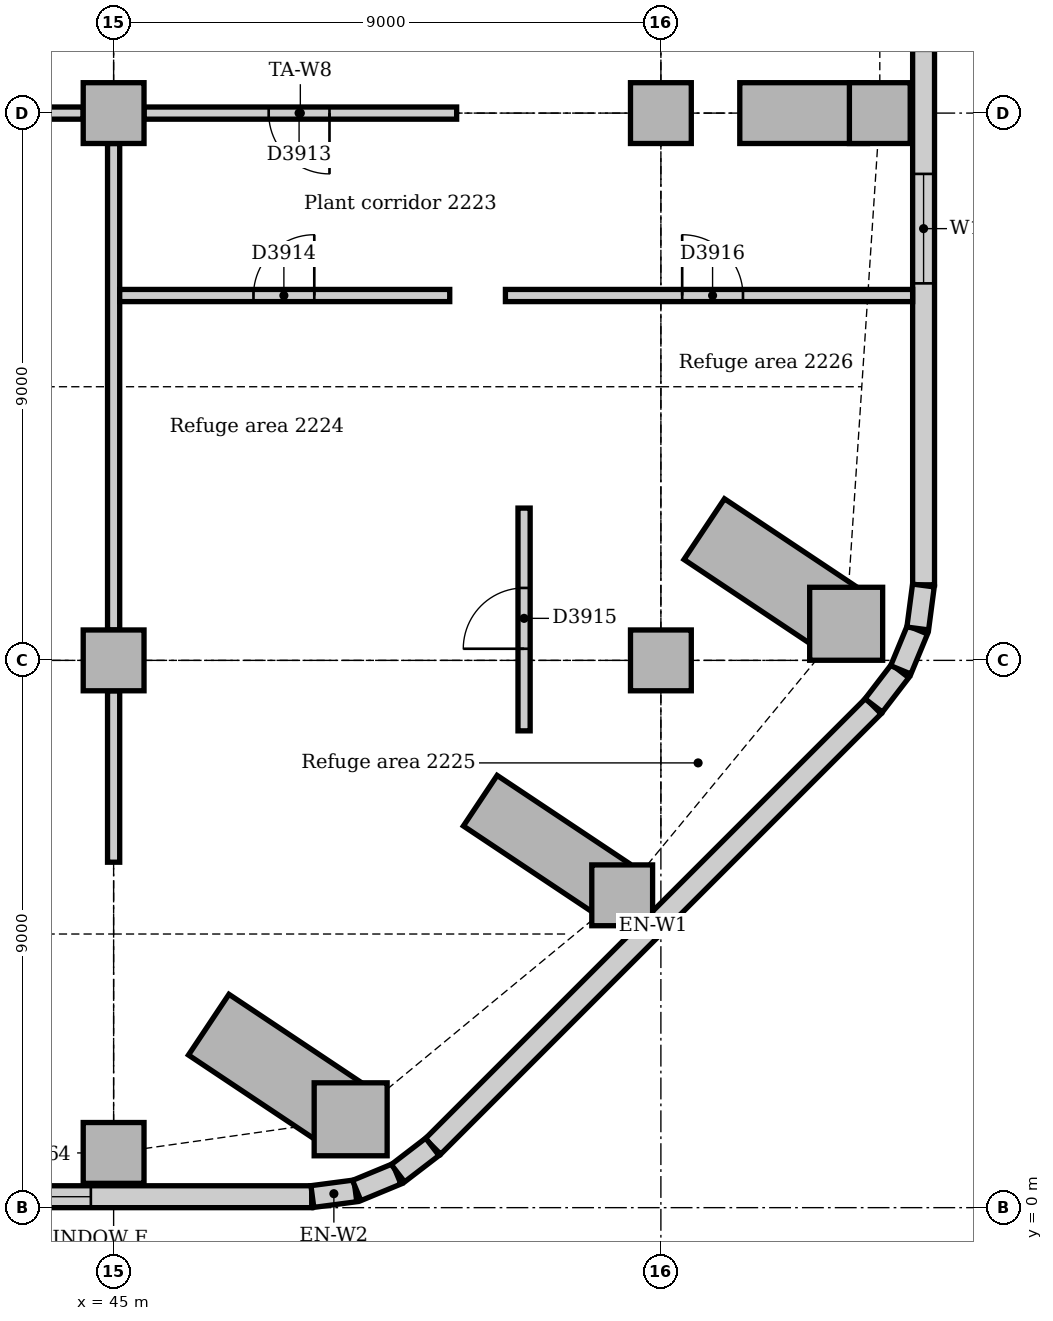
"""IFC4 building model, lengths in metres.
Left out: names, types, materials, properties, quantities, classifications, styles, units other than length and angle.
Written with IfcOpenShell. Run it as: python <this file> out.ifc"""

import sys

from ifc_helpers import new_model, si_unit, direction, frame, frame_2d, origin, origin_2d, place, context, subcontext, project, spatial, rectangle, extrude, element, fill, save


model = new_model("IFC4")
c1 = context("Model", 3, precision=1e-05, world=origin(), true_north=direction((0.0, 1.0)))
c2 = subcontext(c1, "Body", "Model", "MODEL_VIEW")
j1 = project(units=[si_unit("LENGTHUNIT", "METRE"), si_unit("PLANEANGLEUNIT", "RADIAN")], contexts=[c1])
p1 = place(None, origin())
s1 = spatial("IfcSite", under=j1, at=p1, CompositionType="ELEMENT")
p2 = place(p1, origin())
s2 = spatial("IfcBuilding", under=s1, at=p2, CompositionType="ELEMENT")
p3 = place(p2, frame((0.0, 0.0, 95.0)))
s3 = spatial("IfcBuildingStorey", under=s2, at=p3, CompositionType="ELEMENT", Elevation=95.0)
for number, where, z_axis, x_axis in (
    (1, (48.898, 1.453, 0.0), (0.0, 0.0, 1.0), (1.0, 0.0, 0.0)),
    (2, (57.047, 9.602, 0.0), (0.0, 0.0, 1.0), (1.0, 0.0, 0.0)),
):
    element("IfcColumn", number, at=place(p3, frame(where, z_axis=z_axis, x_axis=x_axis)), inside=s3, PredefinedType="COLUMN", context=c2, shape_type="SweptSolid", body=[
        extrude(rectangle(XDim=1.2, YDim=1.2, at=origin_2d()), origin(), (0.0, 0.0, 1.0), 4.85),
    ])
for number, where, z_axis, x_axis in (
    (3, (45.0, 0.9, 0.0), (0.0, 0.0, 1.0), (1.0, 0.0, 0.0)),
    (4, (53.364, 5.136, 0.0), (0.0, 0.0, 1.0), (1.0, 0.0, 0.0)),
    (5, (57.6, 18.0, 0.0), (0.0, 0.0, 1.0), (1.0, 0.0, 0.0)),
    (6, (45.0, 9.0, 0.0), (0.0, 0.0, 1.0), (1.0, 0.0, 0.0)),
    (7, (45.0, 18.0, 0.0), (0.0, 0.0, 1.0), (1.0, 0.0, 0.0)),
    (8, (54.0, 9.0, 0.0), (0.0, 0.0, 1.0), (1.0, 0.0, 0.0)),
    (9, (54.0, 18.0, 0.0), (0.0, 0.0, 1.0), (1.0, 0.0, 0.0)),
):
    element("IfcColumn", number, at=place(p3, frame(where, z_axis=z_axis, x_axis=x_axis)), inside=s3, PredefinedType="COLUMN", context=c2, shape_type="SweptSolid", body=[
        extrude(rectangle(XDim=1.0, YDim=1.0, at=origin_2d()), origin(), (0.0, 0.0, 1.0), 4.85),
    ])
p4 = place(p3, frame((4.243, 0.18, 0.0), z_axis=(0.0, 0.0, 1.0), x_axis=(1.0, 0.0, 0.0)))
e10 = element("IfcWall", 10, at=p4, inside=s3, PredefinedType="STANDARD", context=c2, shape_type="SweptSolid", body=[
    extrude(rectangle(XDim=44.015, YDim=0.36, at=frame_2d((22.007, 0.0))), origin(), (0.0, 0.0, 1.0), 4.85),
])
p5 = place(p4, frame((2.257, 0.0, 1.2)))
e11 = element("IfcOpeningElement", 11, at=p5, cuts=e10, PredefinedType="OPENING", context=c2, shape_type="SweptSolid", body=[
    extrude(rectangle(XDim=1.8, YDim=1.2, at=frame_2d((0.9, 0.6))), frame((0.0, 0.19, 0.0), z_axis=(0.0, -1.0, 0.0), x_axis=(1.0, 0.0, 0.0)), (0.0, 0.0, 1.0), 0.38),
])
p6 = place(p4, frame((6.857, 0.0, 0.9)))
e12 = element("IfcOpeningElement", 12, at=p6, cuts=e10, PredefinedType="OPENING", context=c2, shape_type="SweptSolid", body=[
    extrude(rectangle(XDim=3.3, YDim=2.2, at=frame_2d((1.65, 1.1))), frame((0.0, 0.19, 0.0), z_axis=(0.0, -1.0, 0.0), x_axis=(1.0, 0.0, 0.0)), (0.0, 0.0, 1.0), 0.38),
])
p7 = place(p4, frame((11.257, 0.0, 1.2)))
e13 = element("IfcOpeningElement", 13, at=p7, cuts=e10, PredefinedType="OPENING", context=c2, shape_type="SweptSolid", body=[
    extrude(rectangle(XDim=1.8, YDim=1.2, at=frame_2d((0.9, 0.6))), frame((0.0, 0.19, 0.0), z_axis=(0.0, -1.0, 0.0), x_axis=(1.0, 0.0, 0.0)), (0.0, 0.0, 1.0), 0.38),
])
p8 = place(p4, frame((15.857, 0.0, 0.9)))
e14 = element("IfcOpeningElement", 14, at=p8, cuts=e10, PredefinedType="OPENING", context=c2, shape_type="SweptSolid", body=[
    extrude(rectangle(XDim=3.3, YDim=2.2, at=frame_2d((1.65, 1.1))), frame((0.0, 0.19, 0.0), z_axis=(0.0, -1.0, 0.0), x_axis=(1.0, 0.0, 0.0)), (0.0, 0.0, 1.0), 0.38),
])
p9 = place(p4, frame((20.257, 0.0, 1.2)))
e15 = element("IfcOpeningElement", 15, at=p9, cuts=e10, PredefinedType="OPENING", context=c2, shape_type="SweptSolid", body=[
    extrude(rectangle(XDim=1.8, YDim=1.2, at=frame_2d((0.9, 0.6))), frame((0.0, 0.19, 0.0), z_axis=(0.0, -1.0, 0.0), x_axis=(1.0, 0.0, 0.0)), (0.0, 0.0, 1.0), 0.38),
])
p10 = place(p4, frame((24.857, 0.0, 0.9)))
e16 = element("IfcOpeningElement", 16, at=p10, cuts=e10, PredefinedType="OPENING", context=c2, shape_type="SweptSolid", body=[
    extrude(rectangle(XDim=3.3, YDim=2.2, at=frame_2d((1.65, 1.1))), frame((0.0, 0.19, 0.0), z_axis=(0.0, -1.0, 0.0), x_axis=(1.0, 0.0, 0.0)), (0.0, 0.0, 1.0), 0.38),
])
p11 = place(p4, frame((29.257, 0.0, 1.2)))
e17 = element("IfcOpeningElement", 17, at=p11, cuts=e10, PredefinedType="OPENING", context=c2, shape_type="SweptSolid", body=[
    extrude(rectangle(XDim=1.8, YDim=1.2, at=frame_2d((0.9, 0.6))), frame((0.0, 0.19, 0.0), z_axis=(0.0, -1.0, 0.0), x_axis=(1.0, 0.0, 0.0)), (0.0, 0.0, 1.0), 0.38),
])
p12 = place(p4, frame((33.857, 0.0, 0.9)))
e18 = element("IfcOpeningElement", 18, at=p12, cuts=e10, PredefinedType="OPENING", context=c2, shape_type="SweptSolid", body=[
    extrude(rectangle(XDim=3.3, YDim=2.2, at=frame_2d((1.65, 1.1))), frame((0.0, 0.19, 0.0), z_axis=(0.0, -1.0, 0.0), x_axis=(1.0, 0.0, 0.0)), (0.0, 0.0, 1.0), 0.38),
])
p13 = place(p4, frame((38.583, 0.0, 0.9)))
e19 = element("IfcOpeningElement", 19, at=p13, cuts=e10, PredefinedType="OPENING", context=c2, shape_type="SweptSolid", body=[
    extrude(rectangle(XDim=1.8, YDim=2.2, at=frame_2d((0.9, 1.1))), frame((0.0, 0.19, 0.0), z_axis=(0.0, -1.0, 0.0), x_axis=(1.0, 0.0, 0.0)), (0.0, 0.0, 1.0), 0.38),
])
p14 = place(p3, frame((50.251, 1.006, 0.0), z_axis=(0.0, 0.0, 1.0), x_axis=(0.707106781187, 0.707106781187, 0.0)))
e20 = element("IfcWall", 20, at=p14, inside=s3, PredefinedType="STANDARD", context=c2, shape_type="SweptSolid", body=[
    extrude(rectangle(XDim=10.243, YDim=0.36, at=frame_2d((5.121, 0.0))), origin(), (0.0, 0.0, 1.0), 4.85),
])
p15 = place(p3, frame((58.32, 10.243, 0.0), z_axis=(0.0, 0.0, 1.0), x_axis=(0.0, 1.0, 0.0)))
e21 = element("IfcWall", 21, at=p15, inside=s3, PredefinedType="STANDARD", context=c2, shape_type="SweptSolid", body=[
    extrude(rectangle(XDim=24.515, YDim=0.36, at=frame_2d((12.257, 0.0))), origin(), (0.0, 0.0, 1.0), 4.85),
])
p16 = place(p15, frame((4.957, 0.0, 1.2)))
e22 = element("IfcOpeningElement", 22, at=p16, cuts=e21, PredefinedType="OPENING", context=c2, shape_type="SweptSolid", body=[
    extrude(rectangle(XDim=1.8, YDim=1.2, at=frame_2d((0.9, 0.6))), frame((0.0, 0.19, 0.0), z_axis=(0.0, -1.0, 0.0), x_axis=(1.0, 0.0, 0.0)), (0.0, 0.0, 1.0), 0.38),
])
p17 = place(p15, frame((8.782, 0.0, 0.9)))
e23 = element("IfcOpeningElement", 23, at=p17, cuts=e21, PredefinedType="OPENING", context=c2, shape_type="SweptSolid", body=[
    extrude(rectangle(XDim=1.8, YDim=2.2, at=frame_2d((0.9, 1.1))), frame((0.0, 0.19, 0.0), z_axis=(0.0, -1.0, 0.0), x_axis=(1.0, 0.0, 0.0)), (0.0, 0.0, 1.0), 0.38),
])
p18 = place(p15, frame((13.232, 0.0, 0.9)))
e24 = element("IfcOpeningElement", 24, at=p18, cuts=e21, PredefinedType="OPENING", context=c2, shape_type="SweptSolid", body=[
    extrude(rectangle(XDim=1.8, YDim=2.2, at=frame_2d((0.9, 1.1))), frame((0.0, 0.19, 0.0), z_axis=(0.0, -1.0, 0.0), x_axis=(1.0, 0.0, 0.0)), (0.0, 0.0, 1.0), 0.38),
])
p19 = place(p15, frame((19.232, 0.0, 0.9)))
e25 = element("IfcOpeningElement", 25, at=p19, cuts=e21, PredefinedType="OPENING", context=c2, shape_type="SweptSolid", body=[
    extrude(rectangle(XDim=1.8, YDim=2.2, at=frame_2d((0.9, 1.1))), frame((0.0, 0.19, 0.0), z_axis=(0.0, -1.0, 0.0), x_axis=(1.0, 0.0, 0.0)), (0.0, 0.0, 1.0), 0.38),
])
for number, where, z_axis, x_axis in (
    (26, (48.269, 0.183, 0.0), (0.0, 0.0, 1.0), (0.991, 0.131, 0.0)),
    (27, (48.997, 0.282, 0.0), (0.0, 0.0, 1.0), (0.924, 0.383, 0.0)),
):
    element("IfcWall", number, at=place(p3, frame(where, z_axis=z_axis, x_axis=x_axis)), inside=s3, PredefinedType="STANDARD", context=c2, shape_type="SweptSolid", body=[
        extrude(rectangle(XDim=0.713, YDim=0.36, at=frame_2d((0.356, 0.0))), origin(), (0.0, 0.0, 1.0), 4.85),
    ])
for number, where, z_axis, x_axis in (
    (28, (49.675, 0.566, 0.0), (0.0, 0.0, 1.0), (0.793, 0.609, 0.0)),
    (29, (57.5, 8.259, 0.0), (0.0, 0.0, 1.0), (0.609, 0.793, 0.0)),
):
    element("IfcWall", number, at=place(p3, frame(where, z_axis=z_axis, x_axis=x_axis)), inside=s3, PredefinedType="STANDARD", context=c2, shape_type="SweptSolid", body=[
        extrude(rectangle(XDim=0.713, YDim=0.36, at=frame_2d((0.357, 0.0))), origin(), (0.0, 0.0, 1.0), 4.85),
    ])
for number, where, z_axis, x_axis in (
    (30, (57.945, 8.844, 0.0), (0.0, 0.0, 1.0), (0.383, 0.924, 0.0)),
    (31, (58.224, 9.524, 0.0), (0.0, 0.0, 1.0), (0.131, 0.991, 0.0)),
):
    element("IfcWall", number, at=place(p3, frame(where, z_axis=z_axis, x_axis=x_axis)), inside=s3, PredefinedType="STANDARD", context=c2, shape_type="SweptSolid", body=[
        extrude(rectangle(XDim=0.713, YDim=0.36, at=frame_2d((0.356, 0.0))), origin(), (0.0, 0.0, 1.0), 4.85),
    ])
p20 = place(p3, frame((45.5, 18.0, 0.0), z_axis=(0.0, 0.0, 1.0), x_axis=(1.0, 0.0, 0.0)))
e32 = element("IfcWall", 32, at=p20, inside=s3, PredefinedType="PARTITIONING", context=c2, shape_type="SweptSolid", body=[
    extrude(rectangle(XDim=5.141, YDim=0.2, at=frame_2d((2.571, 0.0))), origin(), (0.0, 0.0, 1.0), 4.254),
])
p21 = place(p20, frame((2.05, 0.0, 0.0)))
e33 = element("IfcOpeningElement", 33, at=p21, cuts=e32, PredefinedType="OPENING", context=c2, shape_type="SweptSolid", body=[
    extrude(rectangle(XDim=1.0, YDim=2.1, at=frame_2d((0.5, 1.05))), frame((0.0, 0.11, 0.0), z_axis=(0.0, -1.0, 0.0), x_axis=(1.0, 0.0, 0.0)), (0.0, 0.0, 1.0), 0.22),
])
p22 = place(p3, frame((36.5, 18.0, 0.0), z_axis=(0.0, 0.0, 1.0), x_axis=(1.0, 0.0, 0.0)))
e34 = element("IfcWall", 34, at=p22, inside=s3, PredefinedType="PARTITIONING", context=c2, shape_type="SweptSolid", body=[
    extrude(rectangle(XDim=8.0, YDim=0.2, at=frame_2d((4.0, 0.0))), origin(), (0.0, 0.0, 1.0), 4.158),
])
p23 = place(p22, frame((3.5, 0.0, 0.0)))
e35 = element("IfcOpeningElement", 35, at=p23, cuts=e34, PredefinedType="OPENING", context=c2, shape_type="SweptSolid", body=[
    extrude(rectangle(XDim=1.0, YDim=2.1, at=frame_2d((0.5, 1.05))), frame((0.0, 0.11, 0.0), z_axis=(0.0, -1.0, 0.0), x_axis=(1.0, 0.0, 0.0)), (0.0, 0.0, 1.0), 0.22),
])
p24 = place(p3, frame((45.0, 5.681, 0.0), z_axis=(0.0, 0.0, 1.0), x_axis=(0.0, 1.0, 0.0)))
e36 = element("IfcWall", 36, at=p24, inside=s3, PredefinedType="PARTITIONING", context=c2, shape_type="SweptSolid", body=[
    extrude(rectangle(XDim=2.819, YDim=0.2, at=frame_2d((1.41, 0.0))), origin(), (0.0, 0.0, 1.0), 4.254),
])
p25 = place(p3, frame((45.0, 9.5, 0.0), z_axis=(0.0, 0.0, 1.0), x_axis=(0.0, 1.0, 0.0)))
e37 = element("IfcWall", 37, at=p25, inside=s3, PredefinedType="PARTITIONING", context=c2, shape_type="SweptSolid", body=[
    extrude(rectangle(XDim=8.0, YDim=0.2, at=frame_2d((4.0, 0.0))), origin(), (0.0, 0.0, 1.0), 4.256),
])
p26 = place(p3, frame((45.1, 15.0, 0.0), z_axis=(0.0, 0.0, 1.0), x_axis=(1.0, 0.0, 0.0)))
e38 = element("IfcWall", 38, at=p26, inside=s3, PredefinedType="PARTITIONING", context=c2, shape_type="SweptSolid", body=[
    extrude(rectangle(XDim=5.428, YDim=0.2, at=frame_2d((2.714, 0.0))), origin(), (0.0, 0.0, 1.0), 4.85),
])
p27 = place(p26, frame((2.2, 0.0, 0.0)))
e39 = element("IfcOpeningElement", 39, at=p27, cuts=e38, PredefinedType="OPENING", context=c2, shape_type="SweptSolid", body=[
    extrude(rectangle(XDim=1.0, YDim=2.1, at=frame_2d((0.5, 1.05))), frame((0.0, 0.11, 0.0), z_axis=(0.0, -1.0, 0.0), x_axis=(1.0, 0.0, 0.0)), (0.0, 0.0, 1.0), 0.22),
])
p28 = place(p3, frame((51.443, 15.0, 0.0), z_axis=(0.0, 0.0, 1.0), x_axis=(1.0, 0.0, 0.0)))
e40 = element("IfcWall", 40, at=p28, inside=s3, PredefinedType="PARTITIONING", context=c2, shape_type="SweptSolid", body=[
    extrude(rectangle(XDim=6.697, YDim=0.2, at=frame_2d((3.348, 0.0))), origin(), (0.0, 0.0, 1.0), 4.85),
])
p29 = place(p28, frame((2.907, 0.0, 0.0)))
e41 = element("IfcOpeningElement", 41, at=p29, cuts=e40, PredefinedType="OPENING", context=c2, shape_type="SweptSolid", body=[
    extrude(rectangle(XDim=1.0, YDim=2.1, at=frame_2d((0.5, 1.05))), frame((0.0, 0.11, 0.0), z_axis=(0.0, -1.0, 0.0), x_axis=(1.0, 0.0, 0.0)), (0.0, 0.0, 1.0), 0.22),
])
p30 = place(p3, frame((51.75, 7.841, 0.0), z_axis=(0.0, 0.0, 1.0), x_axis=(0.0, 1.0, 0.0)))
e42 = element("IfcWall", 42, at=p30, inside=s3, PredefinedType="PARTITIONING", context=c2, shape_type="SweptSolid", body=[
    extrude(rectangle(XDim=3.663, YDim=0.2, at=frame_2d((1.832, 0.0))), origin(), (0.0, 0.0, 1.0), 4.85),
])
p31 = place(p30, frame((1.35, 0.0, 0.0)))
e43 = element("IfcOpeningElement", 43, at=p31, cuts=e42, PredefinedType="OPENING", context=c2, shape_type="SweptSolid", body=[
    extrude(rectangle(XDim=1.0, YDim=2.1, at=frame_2d((0.5, 1.05))), frame((0.0, 0.11, 0.0), z_axis=(0.0, -1.0, 0.0), x_axis=(1.0, 0.0, 0.0)), (0.0, 0.0, 1.0), 0.22),
])
p32 = place(p13, origin())
e44 = element("IfcWindow", 44, at=p32, inside=s3, PartitioningType="SINGLE_PANEL", PredefinedType="WINDOW", context=c2, shape_type="SweptSolid", body=[
    extrude(rectangle(XDim=1.8, YDim=2.2, at=frame_2d((0.9, 1.1))), frame((0.0, 0.13, 0.0), z_axis=(0.0, -1.0, 0.0), x_axis=(1.0, 0.0, 0.0)), (0.0, 0.0, 1.0), 0.06),
])
fill(e19, e44)
p33 = place(p16, origin())
e45 = element("IfcWindow", 45, at=p33, inside=s3, PartitioningType="SINGLE_PANEL", PredefinedType="WINDOW", context=c2, shape_type="SweptSolid", body=[
    extrude(rectangle(XDim=1.8, YDim=1.2, at=frame_2d((0.9, 0.6))), frame((0.0, 0.13, 0.0), z_axis=(0.0, -1.0, 0.0), x_axis=(1.0, 0.0, 0.0)), (0.0, 0.0, 1.0), 0.06),
])
fill(e22, e45)
p34 = place(p21, frame((1.0, 0.0, 0.0), z_axis=(0.0, 0.0, 1.0), x_axis=(-1.0, 0.0, 0.0)))
e46 = element("IfcDoor", 46, at=p34, inside=s3, OperationType="SINGLE_SWING_LEFT", PredefinedType="DOOR", context=c2, shape_type="SweptSolid", body=[
    extrude(rectangle(XDim=1.0, YDim=2.1, at=frame_2d((0.5, 1.05))), frame((0.0, 0.025, 0.0), z_axis=(0.0, -1.0, 0.0), x_axis=(1.0, 0.0, 0.0)), (0.0, 0.0, 1.0), 0.05),
])
fill(e33, e46)
p35 = place(p27, origin())
e47 = element("IfcDoor", 47, at=p35, inside=s3, OperationType="SINGLE_SWING_RIGHT", PredefinedType="DOOR", context=c2, shape_type="SweptSolid", body=[
    extrude(rectangle(XDim=1.0, YDim=2.1, at=frame_2d((0.5, 1.05))), frame((0.0, 0.025, 0.0), z_axis=(0.0, -1.0, 0.0), x_axis=(1.0, 0.0, 0.0)), (0.0, 0.0, 1.0), 0.05),
])
fill(e39, e47)
p36 = place(p31, origin())
e48 = element("IfcDoor", 48, at=p36, inside=s3, OperationType="SINGLE_SWING_LEFT", PredefinedType="DOOR", context=c2, shape_type="SweptSolid", body=[
    extrude(rectangle(XDim=1.0, YDim=2.1, at=frame_2d((0.5, 1.05))), frame((0.0, 0.025, 0.0), z_axis=(0.0, -1.0, 0.0), x_axis=(1.0, 0.0, 0.0)), (0.0, 0.0, 1.0), 0.05),
])
fill(e43, e48)
p37 = place(p29, origin())
e49 = element("IfcDoor", 49, at=p37, inside=s3, OperationType="SINGLE_SWING_LEFT", PredefinedType="DOOR", context=c2, shape_type="SweptSolid", body=[
    extrude(rectangle(XDim=1.0, YDim=2.1, at=frame_2d((0.5, 1.05))), frame((0.0, 0.025, 0.0), z_axis=(0.0, -1.0, 0.0), x_axis=(1.0, 0.0, 0.0)), (0.0, 0.0, 1.0), 0.05),
])
fill(e41, e49)
save(model, sys.argv[1])
